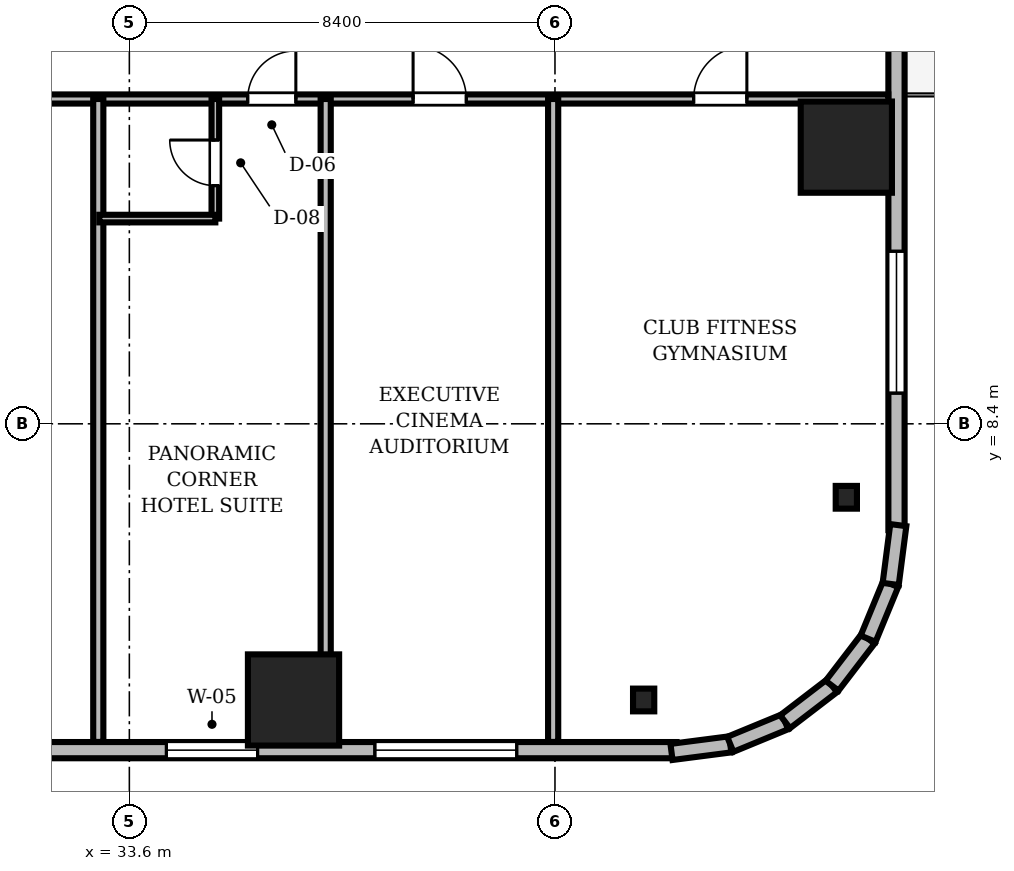
"""IFC4 building model, lengths in metres.
Left out: names, types, materials, properties, quantities, classifications, styles, units other than length and angle.
Written with IfcOpenShell. Run it as: python <this file> out.ifc"""

import sys

from ifc_helpers import new_model, si_unit, direction, frame, frame_2d, origin, origin_2d, place, context, subcontext, project, spatial, rectangle, i_section, extrude, source, transform, mapped, element, fill, save


model = new_model("IFC4")
c1 = context("Model", 3, precision=1e-05, world=origin(), true_north=direction((0.0, 1.0)))
c2 = subcontext(c1, "Body", "Model", "MODEL_VIEW")
j1 = project(units=[si_unit("LENGTHUNIT", "METRE"), si_unit("PLANEANGLEUNIT", "RADIAN")], contexts=[c1])
p1 = place(None, origin())
s1 = spatial("IfcSite", under=j1, at=p1, CompositionType="ELEMENT")
p2 = place(p1, origin())
s2 = spatial("IfcBuilding", under=s1, at=p2, CompositionType="ELEMENT")
p3 = place(p2, frame((0.0, 0.0, 86.0)))
s3 = spatial("IfcBuildingStorey", under=s2, at=p3, CompositionType="ELEMENT", Elevation=86.0)
m1 = source(origin(), c2, "Body", "SweptSolid", [
    extrude(rectangle(XDim=1.8, YDim=1.8, at=origin_2d()), origin(), (0.0, 0.0, 1.0), 3.41),
])
for number, where, z_axis, x_axis in (
    (1, (36.84, 2.95, 0.0), (0.0, 0.0, 1.0), (1.0, 0.0, 0.0)),
    (2, (47.75, 13.86, 0.0), (0.0, 0.0, 1.0), (1.0, 0.0, 0.0)),
):
    element("IfcColumn", number, at=place(p3, frame(where, z_axis=z_axis, x_axis=x_axis)), inside=s3, PredefinedType="COLUMN", context=c2, shape_type="MappedRepresentation", body=[
        mapped(m1, transform((0.0, 0.0, 0.0), scale=1.0)),
    ])
m2 = source(origin(), c2, "Body", "SweptSolid", [
    extrude(i_section(OverallWidth=0.419, OverallDepth=0.449, WebThickness=0.031, FlangeThickness=0.048, FilletRadius=0.015, at=origin_2d()), origin(), (0.0, 0.0, 1.0), 3.41),
])
for number, where, z_axis, x_axis in (
    (3, (43.75, 2.95, 0.0), (0.0, 0.0, 1.0), (1.0, 0.0, 0.0)),
    (4, (47.75, 6.95, 0.0), (0.0, 0.0, 1.0), (1.0, 0.0, 0.0)),
):
    element("IfcColumn", number, at=place(p3, frame(where, z_axis=z_axis, x_axis=x_axis)), inside=s3, PredefinedType="COLUMN", context=c2, shape_type="MappedRepresentation", body=[
        mapped(m2, transform((0.0, 0.0, 0.0), scale=1.0)),
    ])
m3 = source(origin(), c2, "Body", "SweptSolid", [
    extrude(rectangle(XDim=15.6, YDim=0.32, at=frame_2d((7.8, 0.0))), origin(), (0.0, 0.0, 1.0), 3.41),
])
p4 = place(p3, frame((28.8, 1.96, 0.0), z_axis=(0.0, 0.0, 1.0), x_axis=(1.0, 0.0, 0.0)))
e5 = element("IfcWall", 5, at=p4, inside=s3, PredefinedType="SOLIDWALL", context=c2, shape_type="MappedRepresentation", body=[
    mapped(m3, transform((0.0, 0.0, 0.0), scale=1.0)),
])
m4 = source(origin(), c2, "Body", "SweptSolid", [
    extrude(rectangle(XDim=2.8, YDim=2.4, at=frame_2d((1.4, 1.2))), frame((0.0, 0.17, 0.0), z_axis=(0.0, -1.0, 0.0), x_axis=(1.0, 0.0, 0.0)), (0.0, 0.0, 1.0), 0.34),
])
p5 = place(p4, frame((9.645, 0.0, 0.72)))
e6 = element("IfcOpeningElement", 6, at=p5, cuts=e5, PredefinedType="OPENING", context=c2, shape_type="MappedRepresentation", body=[
    mapped(m4, transform((0.0, 0.0, 0.0), scale=1.0)),
])
m5 = source(origin(), c2, "Body", "SweptSolid", [
    extrude(rectangle(XDim=1.8, YDim=2.4, at=frame_2d((0.9, 1.2))), frame((0.0, 0.17, 0.0), z_axis=(0.0, -1.0, 0.0), x_axis=(1.0, 0.0, 0.0)), (0.0, 0.0, 1.0), 0.34),
])
p6 = place(p4, frame((5.531, 0.0, 0.72)))
e7 = element("IfcOpeningElement", 7, at=p6, cuts=e5, PredefinedType="OPENING", context=c2, shape_type="MappedRepresentation", body=[
    mapped(m5, transform((0.0, 0.0, 0.0), scale=1.0)),
])
p7 = place(p3, frame((48.74, 6.3, 0.0), z_axis=(0.0, 0.0, 1.0), x_axis=(0.0, 1.0, 0.0)))
e8 = element("IfcWall", 8, at=p7, inside=s3, PredefinedType="SOLIDWALL", context=c2, shape_type="MappedRepresentation", body=[
    mapped(m3, transform((0.0, 0.0, 0.0), scale=1.0)),
])
m6 = source(origin(), c2, "Body", "SweptSolid", [
    extrude(rectangle(XDim=1.4, YDim=2.3, at=frame_2d((0.7, 1.15))), frame((0.0, 0.17, 0.0), z_axis=(0.0, -1.0, 0.0), x_axis=(1.0, 0.0, 0.0)), (0.0, 0.0, 1.0), 0.34),
])
p8 = place(p7, frame((9.61, 0.0, 0.0)))
e9 = element("IfcOpeningElement", 9, at=p8, cuts=e8, PredefinedType="OPENING", context=c2, shape_type="MappedRepresentation", body=[
    mapped(m6, transform((0.0, 0.0, 0.0), scale=1.0)),
])
p9 = place(p7, frame((2.705, 0.0, 0.72)))
e10 = element("IfcOpeningElement", 10, at=p9, cuts=e8, PredefinedType="OPENING", context=c2, shape_type="MappedRepresentation", body=[
    mapped(m4, transform((0.0, 0.0, 0.0), scale=1.0)),
])
m7 = source(origin(), c2, "Body", "SweptSolid", [
    extrude(rectangle(XDim=1.17, YDim=0.32, at=frame_2d((0.585, 0.0))), origin(), (0.0, 0.0, 1.0), 3.41),
])
p10 = place(p3, frame((44.3, 1.925, 0.0), z_axis=(0.0, 0.0, 1.0), x_axis=(0.991762485493, 0.128090485085, 0.0)))
e11 = element("IfcWall", 11, at=p10, inside=s3, PredefinedType="SOLIDWALL", context=c2, shape_type="MappedRepresentation", body=[
    mapped(m7, transform((0.0, 0.0, 0.0), scale=1.0)),
])
m8 = source(origin(), c2, "Body", "SweptSolid", [
    extrude(rectangle(XDim=1.169, YDim=0.32, at=frame_2d((0.585, 0.0))), origin(), (0.0, 0.0, 1.0), 3.41),
])
p11 = place(p3, frame((45.46, 2.074, 0.0), z_axis=(0.0, 0.0, 1.0), x_axis=(0.924479075121, 0.381232789334, 0.0)))
e12 = element("IfcWall", 12, at=p11, inside=s3, PredefinedType="SOLIDWALL", context=c2, shape_type="MappedRepresentation", body=[
    mapped(m8, transform((0.0, 0.0, 0.0), scale=1.0)),
])
m9 = source(origin(), c2, "Body", "SweptSolid", [
    extrude(rectangle(XDim=1.169, YDim=0.32, at=frame_2d((0.584, 0.0))), origin(), (0.0, 0.0, 1.0), 3.41),
])
p12 = place(p3, frame((46.541, 2.52, 0.0), z_axis=(0.0, 0.0, 1.0), x_axis=(0.793663520347, 0.608356981114, 0.0)))
e13 = element("IfcWall", 13, at=p12, inside=s3, PredefinedType="SOLIDWALL", context=c2, shape_type="MappedRepresentation", body=[
    mapped(m9, transform((0.0, 0.0, 0.0), scale=1.0)),
])
m10 = source(origin(), c2, "Body", "SweptSolid", [
    extrude(rectangle(XDim=1.169, YDim=0.32, at=frame_2d((0.584, 0.0))), origin(), (0.0, 0.0, 1.0), 3.41),
])
for number, where, z_axis, x_axis in (
    (14, (47.469, 3.231, 0.0), (0.0, 0.0, 1.0), (0.608, 0.794, 0.0)),
    (15, (48.18, 4.159, 0.0), (0.0, 0.0, 1.0), (0.381, 0.925, 0.0)),
):
    element("IfcWall", number, at=place(p3, frame(where, z_axis=z_axis, x_axis=x_axis)), inside=s3, PredefinedType="SOLIDWALL", context=c2, shape_type="MappedRepresentation", body=[
        mapped(m10, transform((0.0, 0.0, 0.0), scale=1.0)),
    ])
m11 = source(origin(), c2, "Body", "SweptSolid", [
    extrude(rectangle(XDim=1.171, YDim=0.32, at=frame_2d((0.585, 0.0))), origin(), (0.0, 0.0, 1.0), 3.41),
])
p13 = place(p3, frame((48.625, 5.24, 0.0), z_axis=(0.0, 0.0, 1.0), x_axis=(0.128269133229, 0.991739395941, 0.0)))
e16 = element("IfcWall", 16, at=p13, inside=s3, PredefinedType="SOLIDWALL", context=c2, shape_type="MappedRepresentation", body=[
    mapped(m11, transform((0.0, 0.0, 0.0), scale=1.0)),
])
m12 = source(origin(), c2, "Body", "SweptSolid", [
    extrude(rectangle(XDim=46.156, YDim=0.18, at=frame_2d((23.078, 0.0))), origin(), (0.0, 0.0, 1.0), 2.652),
])
p14 = place(p3, frame((2.422, 14.81, 0.0), z_axis=(0.0, 0.0, 1.0), x_axis=(1.0, 0.0, 0.0)))
e17 = element("IfcWall", 17, at=p14, inside=s3, PredefinedType="PARTITIONING", context=c2, shape_type="MappedRepresentation", body=[
    mapped(m12, transform((0.0, 0.0, 0.0), scale=1.0)),
])
m13 = source(origin(), c2, "Body", "SweptSolid", [
    extrude(rectangle(XDim=1.05, YDim=2.2, at=frame_2d((0.525, 1.1))), frame((0.0, 0.1, 0.0), z_axis=(0.0, -1.0, 0.0), x_axis=(1.0, 0.0, 0.0)), (0.0, 0.0, 1.0), 0.2),
])
p15 = place(p14, frame((15.748, 0.0, 0.0)))
e18 = element("IfcOpeningElement", 18, at=p15, cuts=e17, PredefinedType="OPENING", context=c2, shape_type="MappedRepresentation", body=[
    mapped(m13, transform((0.0, 0.0, 0.0), scale=1.0)),
])
p16 = place(p14, frame((18.823, 0.0, 0.0)))
e19 = element("IfcOpeningElement", 19, at=p16, cuts=e17, PredefinedType="OPENING", context=c2, shape_type="MappedRepresentation", body=[
    mapped(m13, transform((0.0, 0.0, 0.0), scale=1.0)),
])
p17 = place(p14, frame((23.311, 0.0, 0.0)))
e20 = element("IfcOpeningElement", 20, at=p17, cuts=e17, PredefinedType="OPENING", context=c2, shape_type="MappedRepresentation", body=[
    mapped(m13, transform((0.0, 0.0, 0.0), scale=1.0)),
])
p18 = place(p14, frame((27.8, 0.0, 0.0)))
e21 = element("IfcOpeningElement", 21, at=p18, cuts=e17, PredefinedType="OPENING", context=c2, shape_type="MappedRepresentation", body=[
    mapped(m13, transform((0.0, 0.0, 0.0), scale=1.0)),
])
m14 = source(origin(), c2, "Body", "SweptSolid", [
    extrude(rectangle(XDim=0.95, YDim=2.15, at=frame_2d((0.475, 1.075))), frame((0.0, 0.1, 0.0), z_axis=(0.0, -1.0, 0.0), x_axis=(1.0, 0.0, 0.0)), (0.0, 0.0, 1.0), 0.2),
])
p19 = place(p14, frame((33.514, 0.0, 0.0)))
e22 = element("IfcOpeningElement", 22, at=p19, cuts=e17, PredefinedType="OPENING", context=c2, shape_type="MappedRepresentation", body=[
    mapped(m14, transform((0.0, 0.0, 0.0), scale=1.0)),
])
p20 = place(p14, frame((36.778, 0.0, 0.0)))
e23 = element("IfcOpeningElement", 23, at=p20, cuts=e17, PredefinedType="OPENING", context=c2, shape_type="MappedRepresentation", body=[
    mapped(m13, transform((0.0, 0.0, 0.0), scale=1.0)),
])
p21 = place(p14, frame((42.315, 0.0, 0.0)))
e24 = element("IfcOpeningElement", 24, at=p21, cuts=e17, PredefinedType="OPENING", context=c2, shape_type="MappedRepresentation", body=[
    mapped(m13, transform((0.0, 0.0, 0.0), scale=1.0)),
])
m15 = source(origin(), c2, "Body", "SweptSolid", [
    extrude(rectangle(XDim=2.36, YDim=0.15, at=frame_2d((1.18, 0.0))), origin(), (0.0, 0.0, 1.0), 2.802),
])
p22 = place(p3, frame((35.297, 12.45, 0.0), z_axis=(0.0, 0.0, 1.0), x_axis=(0.0, 1.0, 0.0)))
e25 = element("IfcWall", 25, at=p22, inside=s3, PredefinedType="PARTITIONING", context=c2, shape_type="MappedRepresentation", body=[
    mapped(m15, transform((0.0, 0.0, 0.0), scale=1.0)),
])
m16 = source(origin(), c2, "Body", "SweptSolid", [
    extrude(rectangle(XDim=0.9, YDim=2.1, at=frame_2d((0.45, 1.05))), frame((0.0, 0.085, 0.0), z_axis=(0.0, -1.0, 0.0), x_axis=(1.0, 0.0, 0.0)), (0.0, 0.0, 1.0), 0.17),
])
p23 = place(p22, frame((0.65, 0.0, 0.0)))
e26 = element("IfcOpeningElement", 26, at=p23, cuts=e25, PredefinedType="OPENING", context=c2, shape_type="MappedRepresentation", body=[
    mapped(m16, transform((0.0, 0.0, 0.0), scale=1.0)),
])
m17 = source(origin(), c2, "Body", "SweptSolid", [
    extrude(rectangle(XDim=12.688, YDim=0.2, at=frame_2d((6.344, 0.0))), origin(), (0.0, 0.0, 1.0), 2.652),
])
for number, where, z_axis, x_axis in (
    (27, (32.987, 2.122, 0.0), (0.0, 0.0, 1.0), (0.0, 1.0, 0.0)),
    (28, (37.475, 2.122, 0.0), (0.0, 0.0, 1.0), (0.0, 1.0, 0.0)),
    (29, (41.964, 2.122, 0.0), (0.0, 0.0, 1.0), (0.0, 1.0, 0.0)),
):
    element("IfcWall", number, at=place(p3, frame(where, z_axis=z_axis, x_axis=x_axis)), inside=s3, PredefinedType="PARTITIONING", context=c2, shape_type="MappedRepresentation", body=[
        mapped(m17, transform((0.0, 0.0, 0.0), scale=1.0)),
    ])
m18 = source(origin(), c2, "Body", "SweptSolid", [
    extrude(rectangle(XDim=2.29, YDim=0.15, at=frame_2d((1.145, 0.0))), origin(), (0.0, 0.0, 1.0), 2.802),
])
p24 = place(p3, frame((33.007, 12.45, 0.0), z_axis=(0.0, 0.0, 1.0), x_axis=(1.0, 0.0, 0.0)))
e30 = element("IfcWall", 30, at=p24, inside=s3, PredefinedType="PARTITIONING", context=c2, shape_type="MappedRepresentation", body=[
    mapped(m18, transform((0.0, 0.0, 0.0), scale=1.0)),
])
m19 = source(origin(), c2, "Body", "SweptSolid", [
    extrude(rectangle(XDim=2.8, YDim=2.4, at=frame_2d((1.4, 1.2))), frame((0.0, 0.03, 0.0), z_axis=(0.0, -1.0, 0.0), x_axis=(1.0, 0.0, 0.0)), (0.0, 0.0, 1.0), 0.06),
])
p25 = place(p5, origin())
e31 = element("IfcWindow", 31, at=p25, inside=s3, PartitioningType="SINGLE_PANEL", PredefinedType="WINDOW", context=c2, shape_type="MappedRepresentation", body=[
    mapped(m19, transform((0.0, 0.0, 0.0), scale=1.0)),
])
fill(e6, e31)
p26 = place(p9, origin())
e32 = element("IfcWindow", 32, at=p26, inside=s3, PartitioningType="SINGLE_PANEL", PredefinedType="WINDOW", context=c2, shape_type="MappedRepresentation", body=[
    mapped(m19, transform((0.0, 0.0, 0.0), scale=1.0)),
])
fill(e10, e32)
m20 = source(origin(), c2, "Body", "SweptSolid", [
    extrude(rectangle(XDim=1.8, YDim=2.4, at=frame_2d((0.9, 1.2))), frame((0.0, 0.03, 0.0), z_axis=(0.0, -1.0, 0.0), x_axis=(1.0, 0.0, 0.0)), (0.0, 0.0, 1.0), 0.06),
])
p27 = place(p6, origin())
e33 = element("IfcWindow", 33, at=p27, inside=s3, PartitioningType="SINGLE_PANEL", PredefinedType="WINDOW", context=c2, shape_type="MappedRepresentation", body=[
    mapped(m20, transform((0.0, 0.0, 0.0), scale=1.0)),
])
fill(e7, e33)
m21 = source(origin(), c2, "Body", "SweptSolid", [
    extrude(rectangle(XDim=0.95, YDim=2.15, at=frame_2d((0.475, 1.075))), frame((0.0, 0.025, 0.0), z_axis=(0.0, -1.0, 0.0), x_axis=(1.0, 0.0, 0.0)), (0.0, 0.0, 1.0), 0.05),
])
p28 = place(p19, origin())
e34 = element("IfcDoor", 34, at=p28, inside=s3, OperationType="SINGLE_SWING_RIGHT", PredefinedType="DOOR", context=c2, shape_type="MappedRepresentation", body=[
    mapped(m21, transform((0.0, 0.0, 0.0), scale=1.0)),
])
fill(e22, e34)
m22 = source(origin(), c2, "Body", "SweptSolid", [
    extrude(rectangle(XDim=1.05, YDim=2.2, at=frame_2d((0.525, 1.1))), frame((0.0, 0.025, 0.0), z_axis=(0.0, -1.0, 0.0), x_axis=(1.0, 0.0, 0.0)), (0.0, 0.0, 1.0), 0.05),
])
p29 = place(p20, origin())
e35 = element("IfcDoor", 35, at=p29, inside=s3, OperationType="SINGLE_SWING_LEFT", PredefinedType="DOOR", context=c2, shape_type="MappedRepresentation", body=[
    mapped(m22, transform((0.0, 0.0, 0.0), scale=1.0)),
])
fill(e23, e35)
p30 = place(p21, origin())
e36 = element("IfcDoor", 36, at=p30, inside=s3, OperationType="SINGLE_SWING_RIGHT", PredefinedType="DOOR", context=c2, shape_type="MappedRepresentation", body=[
    mapped(m22, transform((0.0, 0.0, 0.0), scale=1.0)),
])
fill(e24, e36)
m23 = source(origin(), c2, "Body", "SweptSolid", [
    extrude(rectangle(XDim=0.9, YDim=2.1, at=frame_2d((0.45, 1.05))), frame((0.0, 0.025, 0.0), z_axis=(0.0, -1.0, 0.0), x_axis=(1.0, 0.0, 0.0)), (0.0, 0.0, 1.0), 0.05),
])
p31 = place(p23, origin())
e37 = element("IfcDoor", 37, at=p31, inside=s3, OperationType="SINGLE_SWING_RIGHT", PredefinedType="DOOR", context=c2, shape_type="MappedRepresentation", body=[
    mapped(m23, transform((0.0, 0.0, 0.0), scale=1.0)),
])
fill(e26, e37)
save(model, sys.argv[1])
